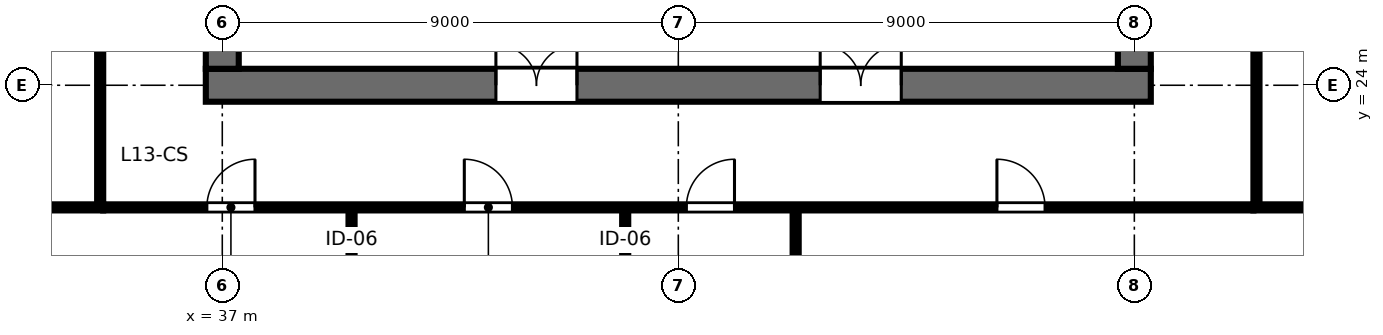
"""IFC4 building model, lengths in metres.
Left out: names, types, materials, properties, quantities, classifications, styles, units other than length and angle.
Written with IfcOpenShell. Run it as: python <this file> out.ifc"""

import sys

from ifc_helpers import new_model, si_unit, direction, frame, frame_2d, origin, place, context, subcontext, project, spatial, rectangle, extrude, element, fill, save


model = new_model("IFC4")
c1 = context("Model", 3, precision=1e-05, world=origin(), true_north=direction((0.0, 1.0)))
c2 = subcontext(c1, "Body", "Model", "MODEL_VIEW")
j1 = project(units=[si_unit("LENGTHUNIT", "METRE"), si_unit("PLANEANGLEUNIT", "RADIAN")], contexts=[c1])
p1 = place(None, origin())
s1 = spatial("IfcSite", under=j1, at=p1, CompositionType="ELEMENT")
p2 = place(p1, origin())
s2 = spatial("IfcBuilding", under=s1, at=p2, CompositionType="ELEMENT")
p3 = place(p2, frame((0.0, 0.0, 53.2)))
s3 = spatial("IfcBuildingStorey", under=s2, at=p3, CompositionType="ELEMENT", Elevation=53.2)
p4 = place(p3, frame((36.675, 24.0, 0.0), z_axis=(0.0, 0.0, 1.0), x_axis=(1.0, 0.0, 0.0)))
e1 = element("IfcWall", 1, at=p4, inside=s3, PredefinedType="SHEAR", context=c2, shape_type="SweptSolid", body=[
    extrude(rectangle(XDim=18.65, YDim=0.65, at=frame_2d((9.325, 0.0))), origin(), (0.0, 0.0, 1.0), 3.36),
])
p5 = place(p4, frame((5.725, 0.0, 0.0)))
e2 = element("IfcOpeningElement", 2, at=p5, cuts=e1, PredefinedType="OPENING", context=c2, shape_type="SweptSolid", body=[
    extrude(rectangle(XDim=1.6, YDim=2.15, at=frame_2d((0.8, 1.075))), frame((0.0, 0.335, 0.0), z_axis=(0.0, -1.0, 0.0), x_axis=(1.0, 0.0, 0.0)), (0.0, 0.0, 1.0), 0.67),
])
p6 = place(p4, frame((12.125, 0.0, 0.0)))
e3 = element("IfcOpeningElement", 3, at=p6, cuts=e1, PredefinedType="OPENING", context=c2, shape_type="SweptSolid", body=[
    extrude(rectangle(XDim=1.6, YDim=2.15, at=frame_2d((0.8, 1.075))), frame((0.0, 0.335, 0.0), z_axis=(0.0, -1.0, 0.0), x_axis=(1.0, 0.0, 0.0)), (0.0, 0.0, 1.0), 0.67),
])
p7 = place(p3, frame((37.0, 24.325, 0.0), z_axis=(0.0, 0.0, 1.0), x_axis=(0.0, 1.0, 0.0)))
e4 = element("IfcWall", 4, at=p7, inside=s3, PredefinedType="SHEAR", context=c2, shape_type="SweptSolid", body=[
    extrude(rectangle(XDim=15.35, YDim=0.65, at=frame_2d((7.675, 0.0))), origin(), (0.0, 0.0, 1.0), 3.36),
])
p8 = place(p7, frame((5.2, 0.0, 0.0)))
e5 = element("IfcOpeningElement", 5, at=p8, cuts=e4, PredefinedType="OPENING", context=c2, shape_type="SweptSolid", body=[
    extrude(rectangle(XDim=1.15, YDim=2.15, at=frame_2d((0.575, 1.075))), frame((0.0, 0.335, 0.0), z_axis=(0.0, -1.0, 0.0), x_axis=(1.0, 0.0, 0.0)), (0.0, 0.0, 1.0), 0.67),
])
p9 = place(p3, frame((55.0, 24.325, 0.0), z_axis=(0.0, 0.0, 1.0), x_axis=(0.0, 1.0, 0.0)))
e6 = element("IfcWall", 6, at=p9, inside=s3, PredefinedType="SHEAR", context=c2, shape_type="SweptSolid", body=[
    extrude(rectangle(XDim=15.35, YDim=0.65, at=frame_2d((7.675, 0.0))), origin(), (0.0, 0.0, 1.0), 3.36),
])
p10 = place(p9, frame((5.2, 0.0, 0.0)))
e7 = element("IfcOpeningElement", 7, at=p10, cuts=e6, PredefinedType="OPENING", context=c2, shape_type="SweptSolid", body=[
    extrude(rectangle(XDim=1.15, YDim=2.15, at=frame_2d((0.575, 1.075))), frame((0.0, 0.335, 0.0), z_axis=(0.0, -1.0, 0.0), x_axis=(1.0, 0.0, 0.0)), (0.0, 0.0, 1.0), 0.67),
])
p11 = place(p3, frame((39.551, 21.59, 0.0), z_axis=(0.0, 0.0, 1.0), x_axis=(0.0, -1.0, 0.0)))
e8 = element("IfcWall", 8, at=p11, inside=s3, PredefinedType="PARTITIONING", context=c2, shape_type="SweptSolid", body=[
    extrude(rectangle(XDim=10.81, YDim=0.12, at=frame_2d((5.405, 0.0))), origin(), (0.0, 0.0, 1.0), 2.64),
])
p12 = place(p11, frame((1.4, 0.0, 0.0)))
e9 = element("IfcOpeningElement", 9, at=p12, cuts=e8, PredefinedType="OPENING", context=c2, shape_type="SweptSolid", body=[
    extrude(rectangle(XDim=0.9, YDim=2.15, at=frame_2d((0.45, 1.075))), frame((0.0, 0.07, 0.0), z_axis=(0.0, -1.0, 0.0), x_axis=(1.0, 0.0, 0.0)), (0.0, 0.0, 1.0), 0.14),
])
p13 = place(p3, frame((44.952, 21.59, 0.0), z_axis=(0.0, 0.0, 1.0), x_axis=(0.0, -1.0, 0.0)))
e10 = element("IfcWall", 10, at=p13, inside=s3, PredefinedType="PARTITIONING", context=c2, shape_type="SweptSolid", body=[
    extrude(rectangle(XDim=10.81, YDim=0.12, at=frame_2d((5.405, 0.0))), origin(), (0.0, 0.0, 1.0), 2.64),
])
p14 = place(p13, frame((1.4, 0.0, 0.0)))
e11 = element("IfcOpeningElement", 11, at=p14, cuts=e10, PredefinedType="OPENING", context=c2, shape_type="SweptSolid", body=[
    extrude(rectangle(XDim=0.9, YDim=2.15, at=frame_2d((0.45, 1.075))), frame((0.0, 0.07, 0.0), z_axis=(0.0, -1.0, 0.0), x_axis=(1.0, 0.0, 0.0)), (0.0, 0.0, 1.0), 0.14),
])
p15 = place(p3, frame((48.316, 21.59, 0.0), z_axis=(0.0, 0.0, 1.0), x_axis=(0.0, -1.0, 0.0)))
e12 = element("IfcWall", 12, at=p15, inside=s3, PredefinedType="PARTITIONING", context=c2, shape_type="SweptSolid", body=[
    extrude(rectangle(XDim=10.81, YDim=0.12, at=frame_2d((5.405, 0.0))), origin(), (0.0, 0.0, 1.0), 2.64),
])
p16 = place(p15, frame((1.4, 0.0, 0.0)))
e13 = element("IfcOpeningElement", 13, at=p16, cuts=e12, PredefinedType="OPENING", context=c2, shape_type="SweptSolid", body=[
    extrude(rectangle(XDim=0.9, YDim=2.15, at=frame_2d((0.45, 1.075))), frame((0.0, 0.07, 0.0), z_axis=(0.0, -1.0, 0.0), x_axis=(1.0, 0.0, 0.0)), (0.0, 0.0, 1.0), 0.14),
])
p17 = place(p3, frame((34.65, 21.59, 0.0), z_axis=(0.0, 0.0, 1.0), x_axis=(1.0, 0.0, 0.0)))
e14 = element("IfcWall", 14, at=p17, inside=s3, PredefinedType="PARTITIONING", context=c2, shape_type="SweptSolid", body=[
    extrude(rectangle(XDim=22.7, YDim=0.12, at=frame_2d((11.35, 0.0))), origin(), (0.0, 0.0, 1.0), 2.64),
])
p18 = place(p17, frame((2.045, 0.0, 0.0)))
e15 = element("IfcOpeningElement", 15, at=p18, cuts=e14, PredefinedType="OPENING", context=c2, shape_type="SweptSolid", body=[
    extrude(rectangle(XDim=0.95, YDim=2.15, at=frame_2d((0.475, 1.075))), frame((0.0, 0.07, 0.0), z_axis=(0.0, -1.0, 0.0), x_axis=(1.0, 0.0, 0.0)), (0.0, 0.0, 1.0), 0.14),
])
p19 = place(p17, frame((7.126, 0.0, 0.0)))
e16 = element("IfcOpeningElement", 16, at=p19, cuts=e14, PredefinedType="OPENING", context=c2, shape_type="SweptSolid", body=[
    extrude(rectangle(XDim=0.95, YDim=2.15, at=frame_2d((0.475, 1.075))), frame((0.0, 0.07, 0.0), z_axis=(0.0, -1.0, 0.0), x_axis=(1.0, 0.0, 0.0)), (0.0, 0.0, 1.0), 0.14),
])
p20 = place(p17, frame((11.509, 0.0, 0.0)))
e17 = element("IfcOpeningElement", 17, at=p20, cuts=e14, PredefinedType="OPENING", context=c2, shape_type="SweptSolid", body=[
    extrude(rectangle(XDim=0.95, YDim=2.15, at=frame_2d((0.475, 1.075))), frame((0.0, 0.07, 0.0), z_axis=(0.0, -1.0, 0.0), x_axis=(1.0, 0.0, 0.0)), (0.0, 0.0, 1.0), 0.14),
])
p21 = place(p17, frame((17.638, 0.0, 0.0)))
e18 = element("IfcOpeningElement", 18, at=p21, cuts=e14, PredefinedType="OPENING", context=c2, shape_type="SweptSolid", body=[
    extrude(rectangle(XDim=0.95, YDim=2.15, at=frame_2d((0.475, 1.075))), frame((0.0, 0.07, 0.0), z_axis=(0.0, -1.0, 0.0), x_axis=(1.0, 0.0, 0.0)), (0.0, 0.0, 1.0), 0.14),
])
p22 = place(p3, frame((34.59, 21.65, 0.0), z_axis=(0.0, 0.0, 1.0), x_axis=(0.0, 1.0, 0.0)))
e19 = element("IfcWall", 19, at=p22, inside=s3, PredefinedType="PARTITIONING", context=c2, shape_type="SweptSolid", body=[
    extrude(rectangle(XDim=20.7, YDim=0.12, at=frame_2d((10.35, 0.0))), origin(), (0.0, 0.0, 1.0), 2.64),
])
p23 = place(p22, frame((9.875, 0.0, 0.0)))
e20 = element("IfcOpeningElement", 20, at=p23, cuts=e19, PredefinedType="OPENING", context=c2, shape_type="SweptSolid", body=[
    extrude(rectangle(XDim=0.95, YDim=2.15, at=frame_2d((0.475, 1.075))), frame((0.0, 0.07, 0.0), z_axis=(0.0, -1.0, 0.0), x_axis=(1.0, 0.0, 0.0)), (0.0, 0.0, 1.0), 0.14),
])
p24 = place(p3, frame((57.41, 21.65, 0.0), z_axis=(0.0, 0.0, 1.0), x_axis=(0.0, 1.0, 0.0)))
e21 = element("IfcWall", 21, at=p24, inside=s3, PredefinedType="PARTITIONING", context=c2, shape_type="SweptSolid", body=[
    extrude(rectangle(XDim=20.7, YDim=0.12, at=frame_2d((10.35, 0.0))), origin(), (0.0, 0.0, 1.0), 2.64),
])
p25 = place(p24, frame((5.479, 0.0, 0.0)))
e22 = element("IfcOpeningElement", 22, at=p25, cuts=e21, PredefinedType="OPENING", context=c2, shape_type="SweptSolid", body=[
    extrude(rectangle(XDim=0.95, YDim=2.15, at=frame_2d((0.475, 1.075))), frame((0.0, 0.07, 0.0), z_axis=(0.0, -1.0, 0.0), x_axis=(1.0, 0.0, 0.0)), (0.0, 0.0, 1.0), 0.14),
])
p26 = place(p24, frame((15.629, 0.0, 0.0)))
e23 = element("IfcOpeningElement", 23, at=p26, cuts=e21, PredefinedType="OPENING", context=c2, shape_type="SweptSolid", body=[
    extrude(rectangle(XDim=0.95, YDim=2.15, at=frame_2d((0.475, 1.075))), frame((0.0, 0.07, 0.0), z_axis=(0.0, -1.0, 0.0), x_axis=(1.0, 0.0, 0.0)), (0.0, 0.0, 1.0), 0.14),
])
for number, where, z_axis, x_axis in (
    (24, (34.65, 21.59, 0.0), (0.0, 0.0, 1.0), (-1.0, 0.0, 0.0)),
    (25, (57.35, 21.59, 0.0), (0.0, 0.0, 1.0), (1.0, 0.0, 0.0)),
):
    element("IfcWall", number, at=place(p3, frame(where, z_axis=z_axis, x_axis=x_axis)), inside=s3, PredefinedType="PARTITIONING", context=c2, shape_type="SweptSolid", body=[
        extrude(rectangle(XDim=12.77, YDim=0.12, at=frame_2d((6.385, 0.0))), origin(), (0.0, 0.0, 1.0), 2.64),
    ])
p27 = place(p5, origin())
e26 = element("IfcDoor", 26, at=p27, inside=s3, OperationType="DOUBLE_DOOR_SINGLE_SWING", PredefinedType="DOOR", context=c2, shape_type="SweptSolid", body=[
    extrude(rectangle(XDim=1.6, YDim=2.15, at=frame_2d((0.8, 1.075))), frame((0.0, 0.025, 0.0), z_axis=(0.0, -1.0, 0.0), x_axis=(1.0, 0.0, 0.0)), (0.0, 0.0, 1.0), 0.05),
])
fill(e2, e26)
p28 = place(p6, origin())
e27 = element("IfcDoor", 27, at=p28, inside=s3, OperationType="DOUBLE_DOOR_SINGLE_SWING", PredefinedType="DOOR", context=c2, shape_type="SweptSolid", body=[
    extrude(rectangle(XDim=1.6, YDim=2.15, at=frame_2d((0.8, 1.075))), frame((0.0, 0.025, 0.0), z_axis=(0.0, -1.0, 0.0), x_axis=(1.0, 0.0, 0.0)), (0.0, 0.0, 1.0), 0.05),
])
fill(e3, e27)
p29 = place(p18, origin())
e28 = element("IfcDoor", 28, at=p29, inside=s3, OperationType="SINGLE_SWING_RIGHT", PredefinedType="DOOR", context=c2, shape_type="SweptSolid", body=[
    extrude(rectangle(XDim=0.95, YDim=2.15, at=frame_2d((0.475, 1.075))), frame((0.0, 0.025, 0.0), z_axis=(0.0, -1.0, 0.0), x_axis=(1.0, 0.0, 0.0)), (0.0, 0.0, 1.0), 0.05),
])
fill(e15, e28)
p30 = place(p19, origin())
e29 = element("IfcDoor", 29, at=p30, inside=s3, OperationType="SINGLE_SWING_LEFT", PredefinedType="DOOR", context=c2, shape_type="SweptSolid", body=[
    extrude(rectangle(XDim=0.95, YDim=2.15, at=frame_2d((0.475, 1.075))), frame((0.0, 0.025, 0.0), z_axis=(0.0, -1.0, 0.0), x_axis=(1.0, 0.0, 0.0)), (0.0, 0.0, 1.0), 0.05),
])
fill(e16, e29)
p31 = place(p20, origin())
e30 = element("IfcDoor", 30, at=p31, inside=s3, OperationType="SINGLE_SWING_RIGHT", PredefinedType="DOOR", context=c2, shape_type="SweptSolid", body=[
    extrude(rectangle(XDim=0.95, YDim=2.15, at=frame_2d((0.475, 1.075))), frame((0.0, 0.025, 0.0), z_axis=(0.0, -1.0, 0.0), x_axis=(1.0, 0.0, 0.0)), (0.0, 0.0, 1.0), 0.05),
])
fill(e17, e30)
p32 = place(p21, origin())
e31 = element("IfcDoor", 31, at=p32, inside=s3, OperationType="SINGLE_SWING_LEFT", PredefinedType="DOOR", context=c2, shape_type="SweptSolid", body=[
    extrude(rectangle(XDim=0.95, YDim=2.15, at=frame_2d((0.475, 1.075))), frame((0.0, 0.025, 0.0), z_axis=(0.0, -1.0, 0.0), x_axis=(1.0, 0.0, 0.0)), (0.0, 0.0, 1.0), 0.05),
])
fill(e18, e31)
save(model, sys.argv[1])
